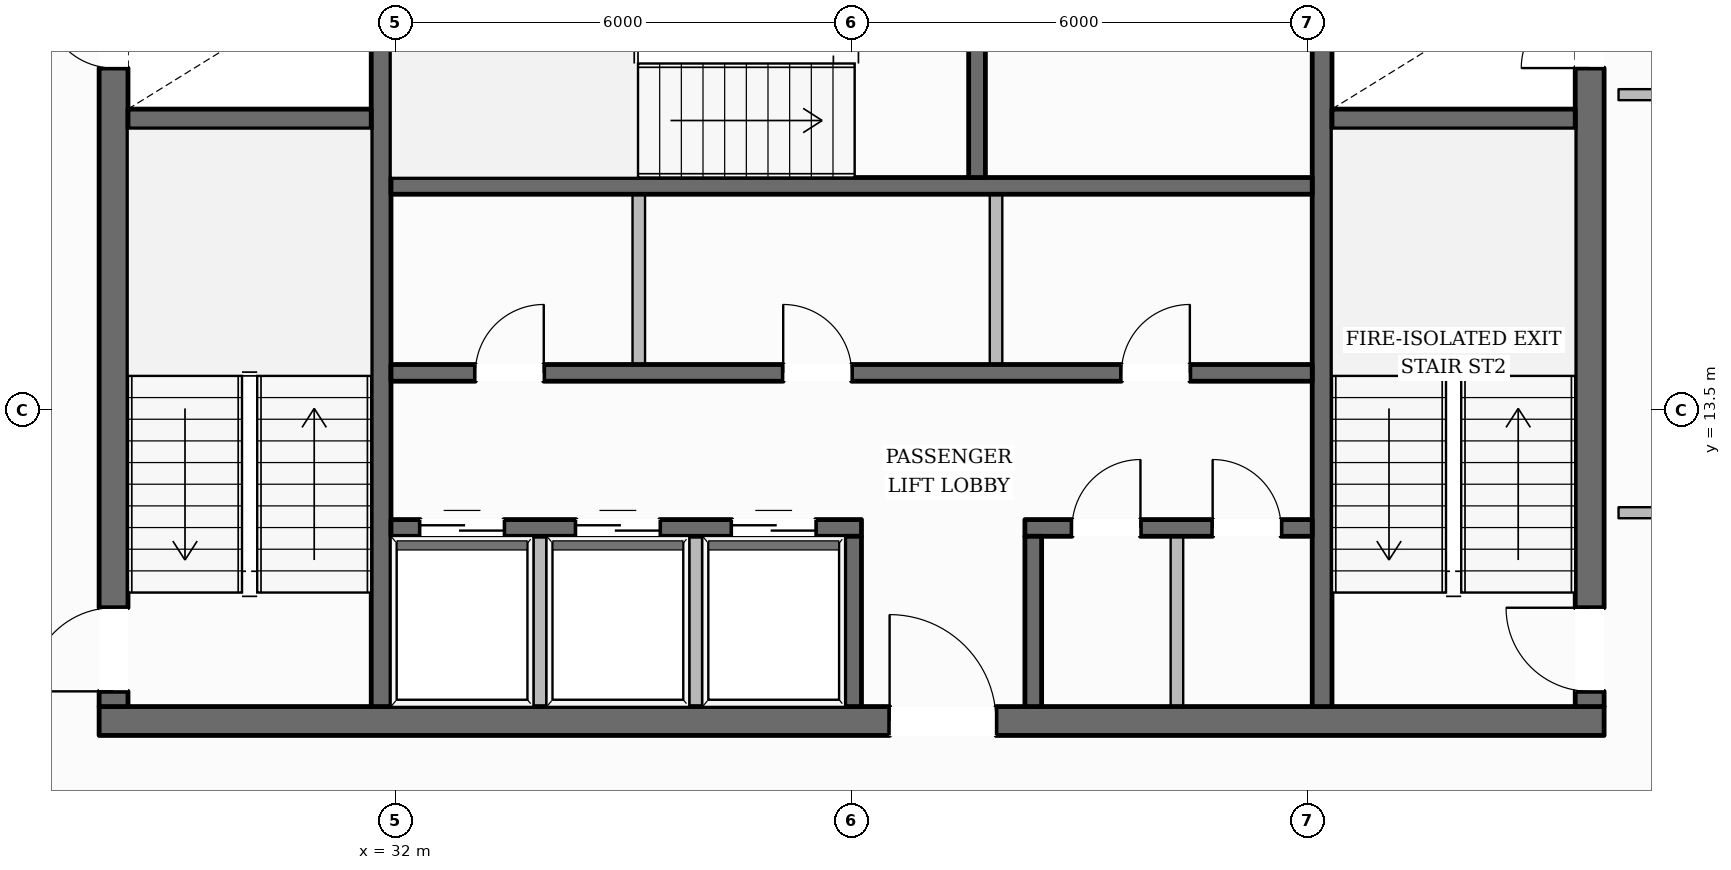
"""IFC4 building model, lengths in metres.
Left out: names, types, materials, properties, quantities, classifications, styles, units other than length and angle.
Written with IfcOpenShell. Run it as: python <this file> out.ifc"""

import sys

from ifc_helpers import new_model, si_unit, direction, frame, frame_2d, origin, place, context, subcontext, project, spatial, rectangle, extrude, element, fill, save


model = new_model("IFC4")
c1 = context("Model", 3, precision=1e-05, world=origin(), true_north=direction((0.0, 1.0)))
c2 = subcontext(c1, "Body", "Model", "MODEL_VIEW")
j1 = project(units=[si_unit("LENGTHUNIT", "METRE"), si_unit("PLANEANGLEUNIT", "RADIAN")], contexts=[c1])
p1 = place(None, origin())
s1 = spatial("IfcSite", under=j1, at=p1, CompositionType="ELEMENT")
p2 = place(p1, origin())
s2 = spatial("IfcBuilding", under=s1, at=p2, CompositionType="ELEMENT")
p3 = place(p2, frame((0.0, 0.0, 254.9)))
s3 = spatial("IfcBuildingStorey", under=s2, at=p3, CompositionType="ELEMENT", Elevation=254.9)
p4 = place(p3, frame((28.1, 9.41, 0.0), z_axis=(0.0, 0.0, 1.0), x_axis=(1.0, 0.0, 0.0)))
e1 = element("IfcWall", 1, at=p4, inside=s3, PredefinedType="SOLIDWALL", context=c2, shape_type="SweptSolid", body=[
    extrude(rectangle(XDim=19.8, YDim=0.38, at=frame_2d((9.9, 0.0))), origin(), (0.0, 0.0, 1.0), 3.61),
])
p5 = place(p4, frame((10.4, 0.0, 0.0)))
e2 = element("IfcOpeningElement", 2, at=p5, cuts=e1, PredefinedType="OPENING", context=c2, shape_type="SweptSolid", body=[
    extrude(rectangle(XDim=1.4, YDim=2.2, at=frame_2d((0.7, 1.1))), frame((0.0, 0.2, 0.0), z_axis=(0.0, -1.0, 0.0), x_axis=(1.0, 0.0, 0.0)), (0.0, 0.0, 1.0), 0.4),
])
p6 = place(p3, frame((28.29, 9.6, 0.0), z_axis=(0.0, 0.0, 1.0), x_axis=(0.0, 1.0, 0.0)))
e3 = element("IfcWall", 3, at=p6, inside=s3, PredefinedType="SOLIDWALL", context=c2, shape_type="SweptSolid", body=[
    extrude(rectangle(XDim=13.0, YDim=0.38, at=frame_2d((6.5, 0.0))), origin(), (0.0, 0.0, 1.0), 3.61),
])
p7 = place(p6, frame((0.2, 0.0, 0.0)))
e4 = element("IfcOpeningElement", 4, at=p7, cuts=e3, PredefinedType="OPENING", context=c2, shape_type="SweptSolid", body=[
    extrude(rectangle(XDim=1.1, YDim=2.15, at=frame_2d((0.55, 1.075))), frame((0.0, 0.2, 0.0), z_axis=(0.0, -1.0, 0.0), x_axis=(1.0, 0.0, 0.0)), (0.0, 0.0, 1.0), 0.4),
])
p8 = place(p6, frame((8.4, 0.0, 0.0)))
e5 = element("IfcOpeningElement", 5, at=p8, cuts=e3, PredefinedType="OPENING", context=c2, shape_type="SweptSolid", body=[
    extrude(rectangle(XDim=0.9, YDim=2.1, at=frame_2d((0.45, 1.05))), frame((0.0, 0.2, 0.0), z_axis=(0.0, -1.0, 0.0), x_axis=(1.0, 0.0, 0.0)), (0.0, 0.0, 1.0), 0.4),
])
p9 = place(p3, frame((47.71, 9.6, 0.0), z_axis=(0.0, 0.0, 1.0), x_axis=(0.0, 1.0, 0.0)))
e6 = element("IfcWall", 6, at=p9, inside=s3, PredefinedType="SOLIDWALL", context=c2, shape_type="SweptSolid", body=[
    extrude(rectangle(XDim=13.0, YDim=0.38, at=frame_2d((6.5, 0.0))), origin(), (0.0, 0.0, 1.0), 3.61),
])
p10 = place(p9, frame((0.2, 0.0, 0.0)))
e7 = element("IfcOpeningElement", 7, at=p10, cuts=e6, PredefinedType="OPENING", context=c2, shape_type="SweptSolid", body=[
    extrude(rectangle(XDim=1.1, YDim=2.15, at=frame_2d((0.55, 1.075))), frame((0.0, 0.2, 0.0), z_axis=(0.0, -1.0, 0.0), x_axis=(1.0, 0.0, 0.0)), (0.0, 0.0, 1.0), 0.4),
])
p11 = place(p9, frame((8.4, 0.0, 0.0)))
e8 = element("IfcOpeningElement", 8, at=p11, cuts=e6, PredefinedType="OPENING", context=c2, shape_type="SweptSolid", body=[
    extrude(rectangle(XDim=0.9, YDim=2.1, at=frame_2d((0.45, 1.05))), frame((0.0, 0.2, 0.0), z_axis=(0.0, -1.0, 0.0), x_axis=(1.0, 0.0, 0.0)), (0.0, 0.0, 1.0), 0.4),
])
p12 = place(p3, frame((31.81, 9.6, 0.0), z_axis=(0.0, 0.0, 1.0), x_axis=(0.0, 1.0, 0.0)))
e9 = element("IfcWall", 9, at=p12, inside=s3, PredefinedType="SHEAR", context=c2, shape_type="SweptSolid", body=[
    extrude(rectangle(XDim=13.0, YDim=0.26, at=frame_2d((6.5, 0.0))), origin(), (0.0, 0.0, 1.0), 3.61),
])
p13 = place(p12, frame((10.925, 0.0, 0.0)))
e10 = element("IfcOpeningElement", 10, at=p13, cuts=e9, PredefinedType="OPENING", context=c2, shape_type="SweptSolid", body=[
    extrude(rectangle(XDim=1.25, YDim=2.25, at=frame_2d((0.625, 1.125))), frame((0.0, 0.14, 0.0), z_axis=(0.0, -1.0, 0.0), x_axis=(1.0, 0.0, 0.0)), (0.0, 0.0, 1.0), 0.28),
])
p14 = place(p3, frame((44.19, 9.6, 0.0), z_axis=(0.0, 0.0, 1.0), x_axis=(0.0, 1.0, 0.0)))
e11 = element("IfcWall", 11, at=p14, inside=s3, PredefinedType="SHEAR", context=c2, shape_type="SweptSolid", body=[
    extrude(rectangle(XDim=13.0, YDim=0.26, at=frame_2d((6.5, 0.0))), origin(), (0.0, 0.0, 1.0), 3.61),
])
p15 = place(p14, frame((10.925, 0.0, 0.0)))
e12 = element("IfcOpeningElement", 12, at=p15, cuts=e11, PredefinedType="OPENING", context=c2, shape_type="SweptSolid", body=[
    extrude(rectangle(XDim=1.25, YDim=2.25, at=frame_2d((0.625, 1.125))), frame((0.0, 0.14, 0.0), z_axis=(0.0, -1.0, 0.0), x_axis=(1.0, 0.0, 0.0)), (0.0, 0.0, 1.0), 0.28),
])
for number, where, z_axis, x_axis in (
    (13, (28.48, 17.33, 0.0), (0.0, 0.0, 1.0), (1.0, 0.0, 0.0)),
    (14, (44.32, 17.33, 0.0), (0.0, 0.0, 1.0), (1.0, 0.0, 0.0)),
):
    element("IfcWall", number, at=place(p3, frame(where, z_axis=z_axis, x_axis=x_axis)), inside=s3, PredefinedType="SHEAR", context=c2, shape_type="SweptSolid", body=[
        extrude(rectangle(XDim=3.2, YDim=0.26, at=frame_2d((1.6, 0.0))), origin(), (0.0, 0.0, 1.0), 3.61),
    ])
p16 = place(p3, frame((31.94, 16.45, 0.0), z_axis=(0.0, 0.0, 1.0), x_axis=(1.0, 0.0, 0.0)))
e15 = element("IfcWall", 15, at=p16, inside=s3, PredefinedType="SOLIDWALL", context=c2, shape_type="SweptSolid", body=[
    extrude(rectangle(XDim=12.12, YDim=0.22, at=frame_2d((6.06, 0.0))), origin(), (0.0, 0.0, 1.0), 3.61),
])
p17 = place(p3, frame((39.65, 16.56, 0.0), z_axis=(0.0, 0.0, 1.0), x_axis=(0.0, 1.0, 0.0)))
e16 = element("IfcWall", 16, at=p17, inside=s3, PredefinedType="SOLIDWALL", context=c2, shape_type="SweptSolid", body=[
    extrude(rectangle(XDim=3.2, YDim=0.22, at=frame_2d((1.6, 0.0))), origin(), (0.0, 0.0, 1.0), 3.61),
])
p18 = place(p3, frame((31.94, 13.99, 0.0), z_axis=(0.0, 0.0, 1.0), x_axis=(1.0, 0.0, 0.0)))
e17 = element("IfcWall", 17, at=p18, inside=s3, PredefinedType="SOLIDWALL", context=c2, shape_type="SweptSolid", body=[
    extrude(rectangle(XDim=12.12, YDim=0.22, at=frame_2d((6.06, 0.0))), origin(), (0.0, 0.0, 1.0), 3.61),
])
p19 = place(p18, frame((1.11, 0.0, 0.0)))
e18 = element("IfcOpeningElement", 18, at=p19, cuts=e17, PredefinedType="OPENING", context=c2, shape_type="SweptSolid", body=[
    extrude(rectangle(XDim=0.9, YDim=2.1, at=frame_2d((0.45, 1.05))), frame((0.0, 0.12, 0.0), z_axis=(0.0, -1.0, 0.0), x_axis=(1.0, 0.0, 0.0)), (0.0, 0.0, 1.0), 0.24),
])
p20 = place(p18, frame((5.16, 0.0, 0.0)))
e19 = element("IfcOpeningElement", 19, at=p20, cuts=e17, PredefinedType="OPENING", context=c2, shape_type="SweptSolid", body=[
    extrude(rectangle(XDim=0.9, YDim=2.1, at=frame_2d((0.45, 1.05))), frame((0.0, 0.12, 0.0), z_axis=(0.0, -1.0, 0.0), x_axis=(1.0, 0.0, 0.0)), (0.0, 0.0, 1.0), 0.24),
])
p21 = place(p18, frame((9.61, 0.0, 0.0)))
e20 = element("IfcOpeningElement", 20, at=p21, cuts=e17, PredefinedType="OPENING", context=c2, shape_type="SweptSolid", body=[
    extrude(rectangle(XDim=0.9, YDim=2.1, at=frame_2d((0.45, 1.05))), frame((0.0, 0.12, 0.0), z_axis=(0.0, -1.0, 0.0), x_axis=(1.0, 0.0, 0.0)), (0.0, 0.0, 1.0), 0.24),
])
p22 = place(p3, frame((31.94, 11.95, 0.0), z_axis=(0.0, 0.0, 1.0), x_axis=(1.0, 0.0, 0.0)))
e21 = element("IfcWall", 21, at=p22, inside=s3, PredefinedType="SOLIDWALL", context=c2, shape_type="SweptSolid", body=[
    extrude(rectangle(XDim=6.19, YDim=0.22, at=frame_2d((3.095, 0.0))), origin(), (0.0, 0.0, 1.0), 3.61),
])
p23 = place(p22, frame((0.385, 0.0, 0.0)))
e22 = element("IfcOpeningElement", 22, at=p23, cuts=e21, PredefinedType="OPENING", context=c2, shape_type="SweptSolid", body=[
    extrude(rectangle(XDim=1.1, YDim=2.2, at=frame_2d((0.55, 1.1))), frame((0.0, 0.12, 0.0), z_axis=(0.0, -1.0, 0.0), x_axis=(1.0, 0.0, 0.0)), (0.0, 0.0, 1.0), 0.24),
])
p24 = place(p22, frame((2.435, 0.0, 0.0)))
e23 = element("IfcOpeningElement", 23, at=p24, cuts=e21, PredefinedType="OPENING", context=c2, shape_type="SweptSolid", body=[
    extrude(rectangle(XDim=1.1, YDim=2.2, at=frame_2d((0.55, 1.1))), frame((0.0, 0.12, 0.0), z_axis=(0.0, -1.0, 0.0), x_axis=(1.0, 0.0, 0.0)), (0.0, 0.0, 1.0), 0.24),
])
p25 = place(p22, frame((4.485, 0.0, 0.0)))
e24 = element("IfcOpeningElement", 24, at=p25, cuts=e21, PredefinedType="OPENING", context=c2, shape_type="SweptSolid", body=[
    extrude(rectangle(XDim=1.1, YDim=2.2, at=frame_2d((0.55, 1.1))), frame((0.0, 0.12, 0.0), z_axis=(0.0, -1.0, 0.0), x_axis=(1.0, 0.0, 0.0)), (0.0, 0.0, 1.0), 0.24),
])
p26 = place(p3, frame((40.28, 11.95, 0.0), z_axis=(0.0, 0.0, 1.0), x_axis=(1.0, 0.0, 0.0)))
e25 = element("IfcWall", 25, at=p26, inside=s3, PredefinedType="SOLIDWALL", context=c2, shape_type="SweptSolid", body=[
    extrude(rectangle(XDim=3.78, YDim=0.22, at=frame_2d((1.89, 0.0))), origin(), (0.0, 0.0, 1.0), 3.61),
])
p27 = place(p26, frame((0.62, 0.0, 0.0)))
e26 = element("IfcOpeningElement", 26, at=p27, cuts=e25, PredefinedType="OPENING", context=c2, shape_type="SweptSolid", body=[
    extrude(rectangle(XDim=0.9, YDim=2.1, at=frame_2d((0.45, 1.05))), frame((0.0, 0.12, 0.0), z_axis=(0.0, -1.0, 0.0), x_axis=(1.0, 0.0, 0.0)), (0.0, 0.0, 1.0), 0.24),
])
p28 = place(p26, frame((2.47, 0.0, 0.0)))
e27 = element("IfcOpeningElement", 27, at=p28, cuts=e25, PredefinedType="OPENING", context=c2, shape_type="SweptSolid", body=[
    extrude(rectangle(XDim=0.9, YDim=2.1, at=frame_2d((0.45, 1.05))), frame((0.0, 0.12, 0.0), z_axis=(0.0, -1.0, 0.0), x_axis=(1.0, 0.0, 0.0)), (0.0, 0.0, 1.0), 0.24),
])
for number, where, z_axis, x_axis in (
    (28, (38.02, 9.6, 0.0), (0.0, 0.0, 1.0), (0.0, 1.0, 0.0)),
    (29, (40.39, 9.6, 0.0), (0.0, 0.0, 1.0), (0.0, 1.0, 0.0)),
):
    element("IfcWall", number, at=place(p3, frame(where, z_axis=z_axis, x_axis=x_axis)), inside=s3, PredefinedType="SOLIDWALL", context=c2, shape_type="SweptSolid", body=[
        extrude(rectangle(XDim=2.24, YDim=0.22, at=frame_2d((1.12, 0.0))), origin(), (0.0, 0.0, 1.0), 3.61),
    ])
p29 = place(p3, frame((16.214, 11.135, 0.0), z_axis=(0.0, 0.0, 1.0), x_axis=(0.49510347201, 0.868834018673, 0.0)))
e30 = element("IfcWall", 30, at=p29, inside=s3, PredefinedType="STANDARD", context=c2, shape_type="SweptSolid", body=[
    extrude(rectangle(XDim=37.643, YDim=0.35, at=frame_2d((18.822, 0.0))), origin(), (0.0, 0.0, 1.0), 3.196),
])
p30 = place(p29, frame((33.429, 0.0, 0.65)))
e31 = element("IfcOpeningElement", 31, at=p30, cuts=e30, PredefinedType="OPENING", context=c2, shape_type="SweptSolid", body=[
    extrude(rectangle(XDim=1.35, YDim=1.75, at=frame_2d((0.675, 0.875))), frame((0.0, 0.185, 0.0), z_axis=(0.0, -1.0, 0.0), x_axis=(1.0, 0.0, 0.0)), (0.0, 0.0, 1.0), 0.37),
])
p31 = place(p29, frame((27.315, 0.0, 0.65)))
e32 = element("IfcOpeningElement", 32, at=p31, cuts=e30, PredefinedType="OPENING", context=c2, shape_type="SweptSolid", body=[
    extrude(rectangle(XDim=1.35, YDim=1.75, at=frame_2d((0.675, 0.875))), frame((0.0, 0.185, 0.0), z_axis=(0.0, -1.0, 0.0), x_axis=(1.0, 0.0, 0.0)), (0.0, 0.0, 1.0), 0.37),
])
p32 = place(p29, frame((15.087, 0.0, 0.65)))
e33 = element("IfcOpeningElement", 33, at=p32, cuts=e30, PredefinedType="OPENING", context=c2, shape_type="SweptSolid", body=[
    extrude(rectangle(XDim=1.35, YDim=1.75, at=frame_2d((0.675, 0.875))), frame((0.0, 0.185, 0.0), z_axis=(0.0, -1.0, 0.0), x_axis=(1.0, 0.0, 0.0)), (0.0, 0.0, 1.0), 0.37),
])
p33 = place(p29, frame((8.973, 0.0, 0.65)))
e34 = element("IfcOpeningElement", 34, at=p33, cuts=e30, PredefinedType="OPENING", context=c2, shape_type="SweptSolid", body=[
    extrude(rectangle(XDim=1.35, YDim=1.75, at=frame_2d((0.675, 0.875))), frame((0.0, 0.185, 0.0), z_axis=(0.0, -1.0, 0.0), x_axis=(1.0, 0.0, 0.0)), (0.0, 0.0, 1.0), 0.37),
])
p34 = place(p29, frame((2.859, 0.0, 0.65)))
e35 = element("IfcOpeningElement", 35, at=p34, cuts=e30, PredefinedType="OPENING", context=c2, shape_type="SweptSolid", body=[
    extrude(rectangle(XDim=1.35, YDim=1.75, at=frame_2d((0.675, 0.875))), frame((0.0, 0.185, 0.0), z_axis=(0.0, -1.0, 0.0), x_axis=(1.0, 0.0, 0.0)), (0.0, 0.0, 1.0), 0.37),
])
p35 = place(p3, frame((41.284, 43.76, 0.0), z_axis=(0.0, 0.0, 1.0), x_axis=(0.50479404613, -0.863239810824, 0.0)))
e36 = element("IfcWall", 36, at=p35, inside=s3, PredefinedType="STANDARD", context=c2, shape_type="SweptSolid", body=[
    extrude(rectangle(XDim=38.372, YDim=0.35, at=frame_2d((19.186, 0.0))), origin(), (0.0, 0.0, 1.0), 3.196),
])
p36 = place(p35, frame((34.102, 0.0, 0.65)))
e37 = element("IfcOpeningElement", 37, at=p36, cuts=e36, PredefinedType="OPENING", context=c2, shape_type="SweptSolid", body=[
    extrude(rectangle(XDim=1.35, YDim=1.75, at=frame_2d((0.675, 0.875))), frame((0.0, 0.185, 0.0), z_axis=(0.0, -1.0, 0.0), x_axis=(1.0, 0.0, 0.0)), (0.0, 0.0, 1.0), 0.37),
])
p37 = place(p35, frame((27.864, 0.0, 0.65)))
e38 = element("IfcOpeningElement", 38, at=p37, cuts=e36, PredefinedType="OPENING", context=c2, shape_type="SweptSolid", body=[
    extrude(rectangle(XDim=1.35, YDim=1.75, at=frame_2d((0.675, 0.875))), frame((0.0, 0.185, 0.0), z_axis=(0.0, -1.0, 0.0), x_axis=(1.0, 0.0, 0.0)), (0.0, 0.0, 1.0), 0.37),
])
p38 = place(p35, frame((15.39, 0.0, 0.65)))
e39 = element("IfcOpeningElement", 39, at=p38, cuts=e36, PredefinedType="OPENING", context=c2, shape_type="SweptSolid", body=[
    extrude(rectangle(XDim=1.35, YDim=1.75, at=frame_2d((0.675, 0.875))), frame((0.0, 0.185, 0.0), z_axis=(0.0, -1.0, 0.0), x_axis=(1.0, 0.0, 0.0)), (0.0, 0.0, 1.0), 0.37),
])
p39 = place(p35, frame((9.153, 0.0, 0.65)))
e40 = element("IfcOpeningElement", 40, at=p39, cuts=e36, PredefinedType="OPENING", context=c2, shape_type="SweptSolid", body=[
    extrude(rectangle(XDim=1.35, YDim=1.75, at=frame_2d((0.675, 0.875))), frame((0.0, 0.185, 0.0), z_axis=(0.0, -1.0, 0.0), x_axis=(1.0, 0.0, 0.0)), (0.0, 0.0, 1.0), 0.37),
])
p40 = place(p35, frame((2.915, 0.0, 0.65)))
e41 = element("IfcOpeningElement", 41, at=p40, cuts=e36, PredefinedType="OPENING", context=c2, shape_type="SweptSolid", body=[
    extrude(rectangle(XDim=1.35, YDim=1.75, at=frame_2d((0.675, 0.875))), frame((0.0, 0.185, 0.0), z_axis=(0.0, -1.0, 0.0), x_axis=(1.0, 0.0, 0.0)), (0.0, 0.0, 1.0), 0.37),
])
for number, where, z_axis, x_axis in (
    (42, (33.9, 9.49, 0.0), (0.0, 0.0, 1.0), (0.0, 1.0, 0.0)),
    (43, (35.95, 9.49, 0.0), (0.0, 0.0, 1.0), (0.0, 1.0, 0.0)),
):
    element("IfcWall", number, at=place(p3, frame(where, z_axis=z_axis, x_axis=x_axis)), inside=s3, PredefinedType="PARTITIONING", context=c2, shape_type="SweptSolid", body=[
        extrude(rectangle(XDim=2.35, YDim=0.165, at=frame_2d((1.175, 0.0))), origin(), (0.0, 0.0, 1.0), 3.61),
    ])
for number, where, z_axis, x_axis in (
    (44, (35.2, 14.1, 0.0), (0.0, 0.0, 1.0), (0.0, 1.0, 0.0)),
    (45, (39.9, 14.1, 0.0), (0.0, 0.0, 1.0), (0.0, 1.0, 0.0)),
):
    element("IfcWall", number, at=place(p3, frame(where, z_axis=z_axis, x_axis=x_axis)), inside=s3, PredefinedType="PARTITIONING", context=c2, shape_type="SweptSolid", body=[
        extrude(rectangle(XDim=2.24, YDim=0.165, at=frame_2d((1.12, 0.0))), origin(), (0.0, 0.0, 1.0), 3.61),
    ])
p41 = place(p3, frame((42.28, 9.49, 0.0), z_axis=(0.0, 0.0, 1.0), x_axis=(0.0, 1.0, 0.0)))
e46 = element("IfcWall", 46, at=p41, inside=s3, PredefinedType="PARTITIONING", context=c2, shape_type="SweptSolid", body=[
    extrude(rectangle(XDim=2.35, YDim=0.165, at=frame_2d((1.175, 0.0))), origin(), (0.0, 0.0, 1.0), 3.61),
])
for number, where, z_axis, x_axis in (
    (47, (49.91, 17.65, 0.0), (0.0, 0.0, 1.0), (-1.0, 0.0, 0.0)),
    (48, (48.09, 12.15, 0.0), (0.0, 0.0, 1.0), (1.0, 0.0, 0.0)),
):
    element("IfcWall", number, at=place(p3, frame(where, z_axis=z_axis, x_axis=x_axis)), inside=s3, PredefinedType="PARTITIONING", context=c2, shape_type="SweptSolid", body=[
        extrude(rectangle(XDim=1.82, YDim=0.145, at=frame_2d((0.91, 0.0))), origin(), (0.0, 0.0, 1.0), 3.61),
    ])
p42 = place(p7, origin())
e49 = element("IfcDoor", 49, at=p42, inside=s3, OperationType="SINGLE_SWING_LEFT", PredefinedType="DOOR", context=c2, shape_type="SweptSolid", body=[
    extrude(rectangle(XDim=1.1, YDim=2.15, at=frame_2d((0.55, 1.075))), frame((0.0, 0.025, 0.0), z_axis=(0.0, -1.0, 0.0), x_axis=(1.0, 0.0, 0.0)), (0.0, 0.0, 1.0), 0.05),
])
fill(e4, e49)
p43 = place(p10, origin())
e50 = element("IfcDoor", 50, at=p43, inside=s3, OperationType="SINGLE_SWING_RIGHT", PredefinedType="DOOR", context=c2, shape_type="SweptSolid", body=[
    extrude(rectangle(XDim=1.1, YDim=2.15, at=frame_2d((0.55, 1.075))), frame((0.0, 0.025, 0.0), z_axis=(0.0, -1.0, 0.0), x_axis=(1.0, 0.0, 0.0)), (0.0, 0.0, 1.0), 0.05),
])
fill(e7, e50)
p44 = place(p8, origin())
e51 = element("IfcDoor", 51, at=p44, inside=s3, OperationType="SINGLE_SWING_RIGHT", PredefinedType="DOOR", context=c2, shape_type="SweptSolid", body=[
    extrude(rectangle(XDim=0.9, YDim=2.1, at=frame_2d((0.45, 1.05))), frame((0.0, 0.025, 0.0), z_axis=(0.0, -1.0, 0.0), x_axis=(1.0, 0.0, 0.0)), (0.0, 0.0, 1.0), 0.05),
])
fill(e5, e51)
p45 = place(p11, origin())
e52 = element("IfcDoor", 52, at=p45, inside=s3, OperationType="SINGLE_SWING_LEFT", PredefinedType="DOOR", context=c2, shape_type="SweptSolid", body=[
    extrude(rectangle(XDim=0.9, YDim=2.1, at=frame_2d((0.45, 1.05))), frame((0.0, 0.025, 0.0), z_axis=(0.0, -1.0, 0.0), x_axis=(1.0, 0.0, 0.0)), (0.0, 0.0, 1.0), 0.05),
])
fill(e8, e52)
p46 = place(p5, origin())
e53 = element("IfcDoor", 53, at=p46, inside=s3, OperationType="SINGLE_SWING_LEFT", PredefinedType="DOOR", context=c2, shape_type="SweptSolid", body=[
    extrude(rectangle(XDim=1.4, YDim=2.2, at=frame_2d((0.7, 1.1))), frame((0.0, 0.025, 0.0), z_axis=(0.0, -1.0, 0.0), x_axis=(1.0, 0.0, 0.0)), (0.0, 0.0, 1.0), 0.05),
])
fill(e2, e53)
p47 = place(p23, origin())
e54 = element("IfcDoor", 54, at=p47, inside=s3, OperationType="DOUBLE_DOOR_SLIDING", PredefinedType="DOOR", context=c2, shape_type="SweptSolid", body=[
    extrude(rectangle(XDim=1.1, YDim=2.2, at=frame_2d((0.55, 1.1))), frame((0.0, 0.025, 0.0), z_axis=(0.0, -1.0, 0.0), x_axis=(1.0, 0.0, 0.0)), (0.0, 0.0, 1.0), 0.05),
])
fill(e22, e54)
p48 = place(p24, origin())
e55 = element("IfcDoor", 55, at=p48, inside=s3, OperationType="DOUBLE_DOOR_SLIDING", PredefinedType="DOOR", context=c2, shape_type="SweptSolid", body=[
    extrude(rectangle(XDim=1.1, YDim=2.2, at=frame_2d((0.55, 1.1))), frame((0.0, 0.025, 0.0), z_axis=(0.0, -1.0, 0.0), x_axis=(1.0, 0.0, 0.0)), (0.0, 0.0, 1.0), 0.05),
])
fill(e23, e55)
p49 = place(p25, origin())
e56 = element("IfcDoor", 56, at=p49, inside=s3, OperationType="DOUBLE_DOOR_SLIDING", PredefinedType="DOOR", context=c2, shape_type="SweptSolid", body=[
    extrude(rectangle(XDim=1.1, YDim=2.2, at=frame_2d((0.55, 1.1))), frame((0.0, 0.025, 0.0), z_axis=(0.0, -1.0, 0.0), x_axis=(1.0, 0.0, 0.0)), (0.0, 0.0, 1.0), 0.05),
])
fill(e24, e56)
p50 = place(p19, origin())
e57 = element("IfcDoor", 57, at=p50, inside=s3, OperationType="SINGLE_SWING_RIGHT", PredefinedType="DOOR", context=c2, shape_type="SweptSolid", body=[
    extrude(rectangle(XDim=0.9, YDim=2.1, at=frame_2d((0.45, 1.05))), frame((0.0, 0.025, 0.0), z_axis=(0.0, -1.0, 0.0), x_axis=(1.0, 0.0, 0.0)), (0.0, 0.0, 1.0), 0.05),
])
fill(e18, e57)
p51 = place(p20, origin())
e58 = element("IfcDoor", 58, at=p51, inside=s3, OperationType="SINGLE_SWING_LEFT", PredefinedType="DOOR", context=c2, shape_type="SweptSolid", body=[
    extrude(rectangle(XDim=0.9, YDim=2.1, at=frame_2d((0.45, 1.05))), frame((0.0, 0.025, 0.0), z_axis=(0.0, -1.0, 0.0), x_axis=(1.0, 0.0, 0.0)), (0.0, 0.0, 1.0), 0.05),
])
fill(e19, e58)
p52 = place(p21, origin())
e59 = element("IfcDoor", 59, at=p52, inside=s3, OperationType="SINGLE_SWING_RIGHT", PredefinedType="DOOR", context=c2, shape_type="SweptSolid", body=[
    extrude(rectangle(XDim=0.9, YDim=2.1, at=frame_2d((0.45, 1.05))), frame((0.0, 0.025, 0.0), z_axis=(0.0, -1.0, 0.0), x_axis=(1.0, 0.0, 0.0)), (0.0, 0.0, 1.0), 0.05),
])
fill(e20, e59)
p53 = place(p27, origin())
e60 = element("IfcDoor", 60, at=p53, inside=s3, OperationType="SINGLE_SWING_RIGHT", PredefinedType="DOOR", context=c2, shape_type="SweptSolid", body=[
    extrude(rectangle(XDim=0.9, YDim=2.1, at=frame_2d((0.45, 1.05))), frame((0.0, 0.025, 0.0), z_axis=(0.0, -1.0, 0.0), x_axis=(1.0, 0.0, 0.0)), (0.0, 0.0, 1.0), 0.05),
])
fill(e26, e60)
p54 = place(p28, origin())
e61 = element("IfcDoor", 61, at=p54, inside=s3, OperationType="SINGLE_SWING_LEFT", PredefinedType="DOOR", context=c2, shape_type="SweptSolid", body=[
    extrude(rectangle(XDim=0.9, YDim=2.1, at=frame_2d((0.45, 1.05))), frame((0.0, 0.025, 0.0), z_axis=(0.0, -1.0, 0.0), x_axis=(1.0, 0.0, 0.0)), (0.0, 0.0, 1.0), 0.05),
])
fill(e27, e61)
save(model, sys.argv[1])
